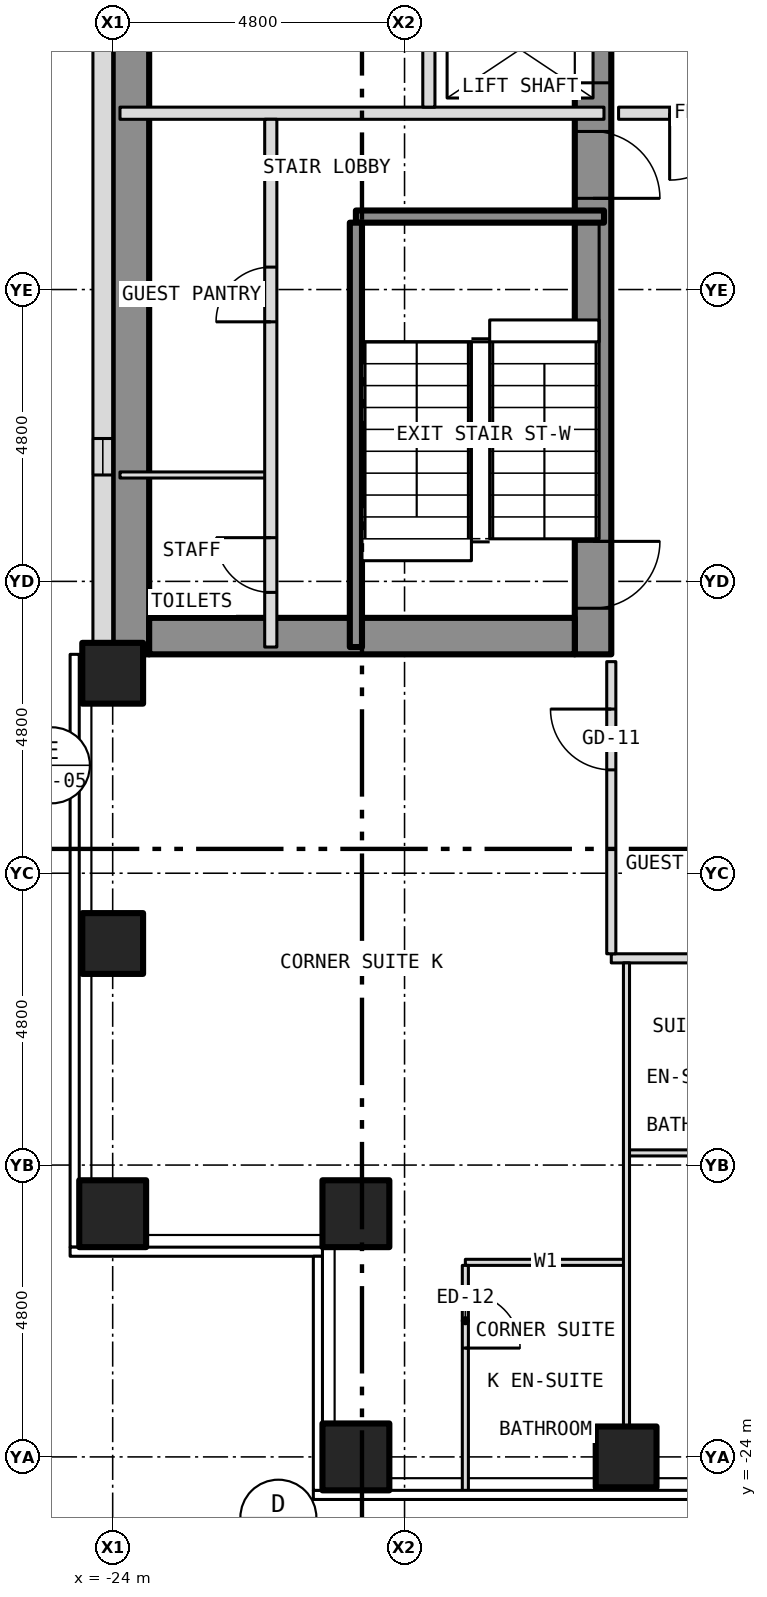
"""IFC4 building model, lengths in metres.
Left out: names, types, materials, properties, quantities, classifications, styles, units other than length and angle.
Written with IfcOpenShell. Run it as: python <this file> out.ifc"""

import sys

from ifc_helpers import new_model, si_unit, direction, frame, frame_2d, origin, origin_2d, place, context, subcontext, project, spatial, rectangle, hollow_rectangle, extrude, element, fill, save


model = new_model("IFC4")
c1 = context("Model", 3, precision=1e-05, world=origin(), true_north=direction((0.0, 1.0)))
c2 = subcontext(c1, "Body", "Model", "MODEL_VIEW")
j1 = project(units=[si_unit("LENGTHUNIT", "METRE"), si_unit("PLANEANGLEUNIT", "RADIAN")], contexts=[c1])
p1 = place(None, origin())
s1 = spatial("IfcSite", under=j1, at=p1, CompositionType="ELEMENT")
p2 = place(p1, origin())
s2 = spatial("IfcBuilding", under=s1, at=p2, CompositionType="ELEMENT")
p3 = place(p2, frame((0.0, 0.0, 39.0)))
s3 = spatial("IfcBuildingStorey", under=s2, at=p3, CompositionType="ELEMENT", Elevation=39.0)
p4 = place(p3, frame((-20.0, -24.0, -0.15), z_axis=(0.0, 0.0, 1.0), x_axis=(1.0, 0.0, 0.0)))
e1 = element("IfcColumn", 1, at=p4, inside=s3, PredefinedType="COLUMN", context=c2, shape_type="SweptSolid", body=[
    extrude(hollow_rectangle(XDim=1.1, YDim=1.1, WallThickness=0.065, at=origin_2d()), origin(), (0.0, 0.0, 1.0), 3.5),
])
p5 = place(p3, frame((-15.556, -24.0, -0.15), z_axis=(0.0, 0.0, 1.0), x_axis=(1.0, 0.0, 0.0)))
e2 = element("IfcColumn", 2, at=p5, inside=s3, PredefinedType="COLUMN", context=c2, shape_type="SweptSolid", body=[
    extrude(hollow_rectangle(XDim=1.0, YDim=1.0, WallThickness=0.06, at=origin_2d()), origin(), (0.0, 0.0, 1.0), 3.5),
])
p6 = place(p3, frame((-24.0, -20.0, -0.15), z_axis=(0.0, 0.0, 1.0), x_axis=(1.0, 0.0, 0.0)))
e3 = element("IfcColumn", 3, at=p6, inside=s3, PredefinedType="COLUMN", context=c2, shape_type="SweptSolid", body=[
    extrude(hollow_rectangle(XDim=1.1, YDim=1.1, WallThickness=0.065, at=origin_2d()), origin(), (0.0, 0.0, 1.0), 3.5),
])
for number, where, z_axis, x_axis in (
    (4, (-24.0, -15.556, -0.15), (0.0, 0.0, 1.0), (1.0, 0.0, 0.0)),
    (5, (-24.0, -11.111, -0.15), (0.0, 0.0, 1.0), (1.0, 0.0, 0.0)),
):
    element("IfcColumn", number, at=place(p3, frame(where, z_axis=z_axis, x_axis=x_axis)), inside=s3, PredefinedType="COLUMN", context=c2, shape_type="SweptSolid", body=[
        extrude(hollow_rectangle(XDim=1.0, YDim=1.0, WallThickness=0.06, at=origin_2d()), origin(), (0.0, 0.0, 1.0), 3.5),
    ])
p7 = place(p3, frame((-20.0, -20.0, -0.15), z_axis=(0.0, 0.0, 1.0), x_axis=(1.0, 0.0, 0.0)))
e6 = element("IfcColumn", 6, at=p7, inside=s3, PredefinedType="COLUMN", context=c2, shape_type="SweptSolid", body=[
    extrude(hollow_rectangle(XDim=1.1, YDim=1.1, WallThickness=0.065, at=origin_2d()), origin(), (0.0, 0.0, 1.0), 3.5),
])
p8 = place(p3, frame((-16.1, -10.8, 0.0), z_axis=(0.0, 0.0, 1.0), x_axis=(0.0, 1.0, 0.0)))
e7 = element("IfcWall", 7, at=p8, inside=s3, PredefinedType="SHEAR", context=c2, shape_type="SweptSolid", body=[
    extrude(rectangle(XDim=21.6, YDim=0.6, at=frame_2d((10.8, 0.0))), origin(), (0.0, 0.0, 1.0), 3.25),
])
p9 = place(p8, frame((9.4, 0.0, 0.0)))
e8 = element("IfcOpeningElement", 8, at=p9, cuts=e7, PredefinedType="OPENING", context=c2, shape_type="SweptSolid", body=[
    extrude(rectangle(XDim=1.1, YDim=2.1, at=frame_2d((0.55, 1.05))), frame((0.0, 0.312, 0.0), z_axis=(0.0, -1.0, 0.0), x_axis=(1.0, 0.0, 0.0)), (0.0, 0.0, 1.0), 0.624),
])
p10 = place(p8, frame((11.5, 0.0, 0.0)))
e9 = element("IfcOpeningElement", 9, at=p10, cuts=e7, PredefinedType="OPENING", context=c2, shape_type="SweptSolid", body=[
    extrude(rectangle(XDim=1.1, YDim=2.1, at=frame_2d((0.55, 1.05))), frame((0.0, 0.312, 0.0), z_axis=(0.0, -1.0, 0.0), x_axis=(1.0, 0.0, 0.0)), (0.0, 0.0, 1.0), 0.624),
])
p11 = place(p8, frame((13.6, 0.0, 0.0)))
e10 = element("IfcOpeningElement", 10, at=p11, cuts=e7, PredefinedType="OPENING", context=c2, shape_type="SweptSolid", body=[
    extrude(rectangle(XDim=1.1, YDim=2.1, at=frame_2d((0.55, 1.05))), frame((0.0, 0.312, 0.0), z_axis=(0.0, -1.0, 0.0), x_axis=(1.0, 0.0, 0.0)), (0.0, 0.0, 1.0), 0.624),
])
p12 = place(p8, frame((15.7, 0.0, 0.0)))
e11 = element("IfcOpeningElement", 11, at=p12, cuts=e7, PredefinedType="OPENING", context=c2, shape_type="SweptSolid", body=[
    extrude(rectangle(XDim=1.1, YDim=2.1, at=frame_2d((0.55, 1.05))), frame((0.0, 0.312, 0.0), z_axis=(0.0, -1.0, 0.0), x_axis=(1.0, 0.0, 0.0)), (0.0, 0.0, 1.0), 0.624),
])
p13 = place(p8, frame((17.8, 0.0, 0.0)))
e12 = element("IfcOpeningElement", 12, at=p13, cuts=e7, PredefinedType="OPENING", context=c2, shape_type="SweptSolid", body=[
    extrude(rectangle(XDim=1.1, YDim=2.1, at=frame_2d((0.55, 1.05))), frame((0.0, 0.312, 0.0), z_axis=(0.0, -1.0, 0.0), x_axis=(1.0, 0.0, 0.0)), (0.0, 0.0, 1.0), 0.624),
])
p14 = place(p8, frame((0.758, 0.0, 0.0)))
e13 = element("IfcOpeningElement", 13, at=p14, cuts=e7, PredefinedType="OPENING", context=c2, shape_type="SweptSolid", body=[
    extrude(rectangle(XDim=1.1, YDim=2.1, at=frame_2d((0.55, 1.05))), frame((0.0, 0.312, 0.0), z_axis=(0.0, -1.0, 0.0), x_axis=(1.0, 0.0, 0.0)), (0.0, 0.0, 1.0), 0.624),
])
p15 = place(p8, frame((7.5, 0.0, 0.0)))
e14 = element("IfcOpeningElement", 14, at=p15, cuts=e7, PredefinedType="OPENING", context=c2, shape_type="SweptSolid", body=[
    extrude(rectangle(XDim=1.1, YDim=2.1, at=frame_2d((0.55, 1.05))), frame((0.0, 0.312, 0.0), z_axis=(0.0, -1.0, 0.0), x_axis=(1.0, 0.0, 0.0)), (0.0, 0.0, 1.0), 0.624),
])
p16 = place(p3, frame((-23.7, -10.8, 0.0), z_axis=(0.0, 0.0, 1.0), x_axis=(0.0, 1.0, 0.0)))
e15 = element("IfcWall", 15, at=p16, inside=s3, PredefinedType="SHEAR", context=c2, shape_type="SweptSolid", body=[
    extrude(rectangle(XDim=21.6, YDim=0.6, at=frame_2d((10.8, 0.0))), origin(), (0.0, 0.0, 1.0), 3.25),
])
p17 = place(p3, frame((-23.4, -10.5, 0.0), z_axis=(0.0, 0.0, 1.0), x_axis=(1.0, 0.0, 0.0)))
e16 = element("IfcWall", 16, at=p17, inside=s3, PredefinedType="SHEAR", context=c2, shape_type="SweptSolid", body=[
    extrude(rectangle(XDim=7.0, YDim=0.6, at=frame_2d((3.5, 0.0))), origin(), (0.0, 0.0, 1.0), 3.25),
])
p18 = place(p3, frame((-24.163, 10.8, 0.0), z_axis=(0.0, 0.0, 1.0), x_axis=(0.0, -1.0, 0.0)))
e17 = element("IfcWall", 17, at=p18, inside=s3, PredefinedType="SOLIDWALL", context=c2, shape_type="SweptSolid", body=[
    extrude(rectangle(XDim=21.6, YDim=0.325, at=frame_2d((10.8, 0.0))), origin(), (0.0, 0.0, 1.0), 3.5),
])
p19 = place(p18, frame((18.05, 0.0, 1.0)))
e18 = element("IfcOpeningElement", 18, at=p19, cuts=e17, PredefinedType="OPENING", context=c2, shape_type="SweptSolid", body=[
    extrude(rectangle(XDim=0.6, YDim=1.5, at=frame_2d((0.3, 0.75))), frame((0.0, 0.175, 0.0), z_axis=(0.0, -1.0, 0.0), x_axis=(1.0, 0.0, 0.0)), (0.0, 0.0, 1.0), 0.349),
])
p20 = place(p3, frame((-18.2, -20.8, 0.0), z_axis=(0.0, 0.0, 1.0), x_axis=(1.0, 0.0, 0.0)))
e19 = element("IfcWall", 19, at=p20, inside=s3, PredefinedType="PARTITIONING", context=c2, shape_type="SweptSolid", body=[
    extrude(rectangle(XDim=2.65, YDim=0.1, at=frame_2d((1.325, 0.0))), origin(), (0.0, 0.0, 1.0), 3.35),
])
p21 = place(p3, frame((-15.55, -19.0, 0.0), z_axis=(0.0, 0.0, 1.0), x_axis=(1.0, 0.0, 0.0)))
e20 = element("IfcWall", 20, at=p21, inside=s3, PredefinedType="PARTITIONING", context=c2, shape_type="SweptSolid", body=[
    extrude(rectangle(XDim=2.2, YDim=0.1, at=frame_2d((1.1, 0.0))), origin(), (0.0, 0.0, 1.0), 3.35),
])
p22 = place(p3, frame((-15.8, -15.8, 0.0), z_axis=(0.0, 0.0, 1.0), x_axis=(1.0, 0.0, 0.0)))
e21 = element("IfcWall", 21, at=p22, inside=s3, PredefinedType="PARTITIONING", context=c2, shape_type="SweptSolid", body=[
    extrude(rectangle(XDim=31.6, YDim=0.15, at=frame_2d((15.8, 0.0))), origin(), (0.0, 0.0, 1.0), 3.35),
])
p23 = place(p22, frame((6.633, 0.0, 0.0)))
e22 = element("IfcOpeningElement", 22, at=p23, cuts=e21, PredefinedType="OPENING", context=c2, shape_type="SweptSolid", body=[
    extrude(rectangle(XDim=1.0, YDim=2.1, at=frame_2d((0.5, 1.05))), frame((0.0, 0.087, 0.0), z_axis=(0.0, -1.0, 0.0), x_axis=(1.0, 0.0, 0.0)), (0.0, 0.0, 1.0), 0.174),
])
p24 = place(p22, frame((11.956, 0.0, 0.0)))
e23 = element("IfcOpeningElement", 23, at=p24, cuts=e21, PredefinedType="OPENING", context=c2, shape_type="SweptSolid", body=[
    extrude(rectangle(XDim=1.0, YDim=2.1, at=frame_2d((0.5, 1.05))), frame((0.0, 0.087, 0.0), z_axis=(0.0, -1.0, 0.0), x_axis=(1.0, 0.0, 0.0)), (0.0, 0.0, 1.0), 0.174),
])
p25 = place(p22, frame((16.4, 0.0, 0.0)))
e24 = element("IfcOpeningElement", 24, at=p25, cuts=e21, PredefinedType="OPENING", context=c2, shape_type="SweptSolid", body=[
    extrude(rectangle(XDim=1.0, YDim=2.1, at=frame_2d((0.5, 1.05))), frame((0.0, 0.087, 0.0), z_axis=(0.0, -1.0, 0.0), x_axis=(1.0, 0.0, 0.0)), (0.0, 0.0, 1.0), 0.174),
])
p26 = place(p22, frame((21.956, 0.0, 0.0)))
e25 = element("IfcOpeningElement", 25, at=p26, cuts=e21, PredefinedType="OPENING", context=c2, shape_type="SweptSolid", body=[
    extrude(rectangle(XDim=1.0, YDim=2.1, at=frame_2d((0.5, 1.05))), frame((0.0, 0.087, 0.0), z_axis=(0.0, -1.0, 0.0), x_axis=(1.0, 0.0, 0.0)), (0.0, 0.0, 1.0), 0.174),
])
p27 = place(p22, frame((28.623, 0.0, 0.0)))
e26 = element("IfcOpeningElement", 26, at=p27, cuts=e21, PredefinedType="OPENING", context=c2, shape_type="SweptSolid", body=[
    extrude(rectangle(XDim=1.0, YDim=2.1, at=frame_2d((0.5, 1.05))), frame((0.0, 0.087, 0.0), z_axis=(0.0, -1.0, 0.0), x_axis=(1.0, 0.0, 0.0)), (0.0, 0.0, 1.0), 0.174),
])
p28 = place(p3, frame((-23.88, -7.85, 0.0), z_axis=(0.0, 0.0, 1.0), x_axis=(1.0, 0.0, 0.0)))
e27 = element("IfcWall", 27, at=p28, inside=s3, PredefinedType="PARTITIONING", context=c2, shape_type="SweptSolid", body=[
    extrude(rectangle(XDim=2.48, YDim=0.1, at=frame_2d((1.24, 0.0))), origin(), (0.0, 0.0, 1.0), 3.25),
])
p29 = place(p3, frame((-20.0, -3.6, 0.0), z_axis=(0.0, 0.0, 1.0), x_axis=(1.0, 0.0, 0.0)))
e28 = element("IfcWall", 28, at=p29, inside=s3, PredefinedType="SHEAR", context=c2, shape_type="SweptSolid", body=[
    extrude(rectangle(XDim=4.08, YDim=0.2, at=frame_2d((2.04, 0.0))), origin(), (0.0, 0.0, 1.0), 3.25),
])
p30 = place(p3, frame((-23.88, -1.9, 0.0), z_axis=(0.0, 0.0, 1.0), x_axis=(1.0, 0.0, 0.0)))
e29 = element("IfcWall", 29, at=p30, inside=s3, PredefinedType="PARTITIONING", context=c2, shape_type="SweptSolid", body=[
    extrude(rectangle(XDim=7.96, YDim=0.2, at=frame_2d((3.98, 0.0))), origin(), (0.0, 0.0, 1.0), 3.25),
])
p31 = place(p3, frame((-15.68, -1.9, 0.0), z_axis=(0.0, 0.0, 1.0), x_axis=(1.0, 0.0, 0.0)))
e30 = element("IfcWall", 30, at=p31, inside=s3, PredefinedType="PARTITIONING", context=c2, shape_type="SweptSolid", body=[
    extrude(rectangle(XDim=3.28, YDim=0.2, at=frame_2d((1.64, 0.0))), origin(), (0.0, 0.0, 1.0), 3.35),
])
p32 = place(p31, frame((0.84, 0.0, 0.0)))
e31 = element("IfcOpeningElement", 31, at=p32, cuts=e30, PredefinedType="OPENING", context=c2, shape_type="SweptSolid", body=[
    extrude(rectangle(XDim=1.1, YDim=2.1, at=frame_2d((0.55, 1.05))), frame((0.0, 0.112, 0.0), z_axis=(0.0, -1.0, 0.0), x_axis=(1.0, 0.0, 0.0)), (0.0, 0.0, 1.0), 0.224),
])
p33 = place(p3, frame((-21.4, -10.68, 0.0), z_axis=(0.0, 0.0, 1.0), x_axis=(0.0, 1.0, 0.0)))
e32 = element("IfcWall", 32, at=p33, inside=s3, PredefinedType="PARTITIONING", context=c2, shape_type="SweptSolid", body=[
    extrude(rectangle(XDim=8.68, YDim=0.2, at=frame_2d((4.34, 0.0))), origin(), (0.0, 0.0, 1.0), 3.25),
])
p34 = place(p33, frame((0.899, 0.0, 0.0)))
e33 = element("IfcOpeningElement", 33, at=p34, cuts=e32, PredefinedType="OPENING", context=c2, shape_type="SweptSolid", body=[
    extrude(rectangle(XDim=0.9, YDim=2.1, at=frame_2d((0.45, 1.05))), frame((0.0, 0.112, 0.0), z_axis=(0.0, -1.0, 0.0), x_axis=(1.0, 0.0, 0.0)), (0.0, 0.0, 1.0), 0.224),
])
p35 = place(p33, frame((5.349, 0.0, 0.0)))
e34 = element("IfcOpeningElement", 34, at=p35, cuts=e32, PredefinedType="OPENING", context=c2, shape_type="SweptSolid", body=[
    extrude(rectangle(XDim=0.9, YDim=2.1, at=frame_2d((0.45, 1.05))), frame((0.0, 0.112, 0.0), z_axis=(0.0, -1.0, 0.0), x_axis=(1.0, 0.0, 0.0)), (0.0, 0.0, 1.0), 0.224),
])
p36 = place(p3, frame((-20.0, -10.68, 0.0), z_axis=(0.0, 0.0, 1.0), x_axis=(0.0, 1.0, 0.0)))
e35 = element("IfcWall", 35, at=p36, inside=s3, PredefinedType="SHEAR", context=c2, shape_type="SweptSolid", body=[
    extrude(rectangle(XDim=6.98, YDim=0.2, at=frame_2d((3.49, 0.0))), origin(), (0.0, 0.0, 1.0), 3.25),
])
p37 = place(p3, frame((-18.8, -1.8, 0.0), z_axis=(0.0, 0.0, 1.0), x_axis=(0.0, 1.0, 0.0)))
e36 = element("IfcWall", 36, at=p37, inside=s3, PredefinedType="PARTITIONING", context=c2, shape_type="SweptSolid", body=[
    extrude(rectangle(XDim=12.48, YDim=0.2, at=frame_2d((6.24, 0.0))), origin(), (0.0, 0.0, 1.0), 3.25),
])
p38 = place(p3, frame((-18.2, -24.58, 0.0), z_axis=(0.0, 0.0, 1.0), x_axis=(0.0, 1.0, 0.0)))
e37 = element("IfcWall", 37, at=p38, inside=s3, PredefinedType="PARTITIONING", context=c2, shape_type="SweptSolid", body=[
    extrude(rectangle(XDim=3.73, YDim=0.1, at=frame_2d((1.865, 0.0))), origin(), (0.0, 0.0, 1.0), 3.35),
])
p39 = place(p38, frame((2.37, 0.0, 0.0)))
e38 = element("IfcOpeningElement", 38, at=p39, cuts=e37, PredefinedType="OPENING", context=c2, shape_type="SweptSolid", body=[
    extrude(rectangle(XDim=0.9, YDim=2.1, at=frame_2d((0.45, 1.05))), frame((0.0, 0.062, 0.0), z_axis=(0.0, -1.0, 0.0), x_axis=(1.0, 0.0, 0.0)), (0.0, 0.0, 1.0), 0.124),
])
p40 = place(p3, frame((-15.8, -15.725, 0.0), z_axis=(0.0, 0.0, 1.0), x_axis=(0.0, 1.0, 0.0)))
e39 = element("IfcWall", 39, at=p40, inside=s3, PredefinedType="PARTITIONING", context=c2, shape_type="SweptSolid", body=[
    extrude(rectangle(XDim=4.805, YDim=0.15, at=frame_2d((2.403, 0.0))), origin(), (0.0, 0.0, 1.0), 3.35),
])
p41 = place(p40, frame((3.025, 0.0, 0.0)))
e40 = element("IfcOpeningElement", 40, at=p41, cuts=e39, PredefinedType="OPENING", context=c2, shape_type="SweptSolid", body=[
    extrude(rectangle(XDim=1.0, YDim=2.1, at=frame_2d((0.5, 1.05))), frame((0.0, 0.087, 0.0), z_axis=(0.0, -1.0, 0.0), x_axis=(1.0, 0.0, 0.0)), (0.0, 0.0, 1.0), 0.174),
])
p42 = place(p3, frame((-15.55, -23.88, 0.0), z_axis=(0.0, 0.0, 1.0), x_axis=(0.0, 1.0, 0.0)))
e41 = element("IfcWall", 41, at=p42, inside=s3, PredefinedType="PARTITIONING", context=c2, shape_type="SweptSolid", body=[
    extrude(rectangle(XDim=8.005, YDim=0.1, at=frame_2d((4.002, 0.0))), origin(), (0.0, 0.0, 1.0), 3.35),
])
p43 = place(p19, origin())
e42 = element("IfcWindow", 42, at=p43, inside=s3, PartitioningType="SINGLE_PANEL", PredefinedType="WINDOW", context=c2, shape_type="SweptSolid", body=[
    extrude(rectangle(XDim=0.6, YDim=1.5, at=frame_2d((0.3, 0.75))), frame((0.0, -0.073, 0.0), z_axis=(0.0, -1.0, 0.0), x_axis=(1.0, 0.0, 0.0)), (0.0, 0.0, 1.0), 0.06),
])
fill(e18, e42)
p44 = place(p9, origin())
e43 = element("IfcDoor", 43, at=p44, inside=s3, OperationType="SLIDING_TO_LEFT", PredefinedType="DOOR", context=c2, shape_type="SweptSolid", body=[
    extrude(rectangle(XDim=1.1, YDim=2.1, at=frame_2d((0.55, 1.05))), frame((0.0, 0.025, 0.0), z_axis=(0.0, -1.0, 0.0), x_axis=(1.0, 0.0, 0.0)), (0.0, 0.0, 1.0), 0.05),
])
fill(e8, e43)
p45 = place(p14, origin())
e44 = element("IfcDoor", 44, at=p45, inside=s3, OperationType="SINGLE_SWING_RIGHT", PredefinedType="DOOR", context=c2, shape_type="SweptSolid", body=[
    extrude(rectangle(XDim=1.1, YDim=2.1, at=frame_2d((0.55, 1.05))), frame((0.0, 0.025, 0.0), z_axis=(0.0, -1.0, 0.0), x_axis=(1.0, 0.0, 0.0)), (0.0, 0.0, 1.0), 0.05),
])
fill(e13, e44)
p46 = place(p15, origin())
e45 = element("IfcDoor", 45, at=p46, inside=s3, OperationType="SINGLE_SWING_LEFT", PredefinedType="DOOR", context=c2, shape_type="SweptSolid", body=[
    extrude(rectangle(XDim=1.1, YDim=2.1, at=frame_2d((0.55, 1.05))), frame((0.0, 0.025, 0.0), z_axis=(0.0, -1.0, 0.0), x_axis=(1.0, 0.0, 0.0)), (0.0, 0.0, 1.0), 0.05),
])
fill(e14, e45)
p47 = place(p34, origin())
e46 = element("IfcDoor", 46, at=p47, inside=s3, OperationType="SINGLE_SWING_RIGHT", PredefinedType="DOOR", context=c2, shape_type="SweptSolid", body=[
    extrude(rectangle(XDim=0.9, YDim=2.1, at=frame_2d((0.45, 1.05))), frame((0.0, 0.025, 0.0), z_axis=(0.0, -1.0, 0.0), x_axis=(1.0, 0.0, 0.0)), (0.0, 0.0, 1.0), 0.05),
])
fill(e33, e46)
p48 = place(p35, origin())
e47 = element("IfcDoor", 47, at=p48, inside=s3, OperationType="SINGLE_SWING_LEFT", PredefinedType="DOOR", context=c2, shape_type="SweptSolid", body=[
    extrude(rectangle(XDim=0.9, YDim=2.1, at=frame_2d((0.45, 1.05))), frame((0.0, 0.025, 0.0), z_axis=(0.0, -1.0, 0.0), x_axis=(1.0, 0.0, 0.0)), (0.0, 0.0, 1.0), 0.05),
])
fill(e34, e47)
p49 = place(p32, origin())
e48 = element("IfcDoor", 48, at=p49, inside=s3, OperationType="SINGLE_SWING_LEFT", PredefinedType="DOOR", context=c2, shape_type="SweptSolid", body=[
    extrude(rectangle(XDim=1.1, YDim=2.1, at=frame_2d((0.55, 1.05))), frame((0.0, 0.025, 0.0), z_axis=(0.0, -1.0, 0.0), x_axis=(1.0, 0.0, 0.0)), (0.0, 0.0, 1.0), 0.05),
])
fill(e31, e48)
p50 = place(p39, origin())
e49 = element("IfcDoor", 49, at=p50, inside=s3, OperationType="SINGLE_SWING_LEFT", PredefinedType="DOOR", context=c2, shape_type="SweptSolid", body=[
    extrude(rectangle(XDim=0.9, YDim=2.1, at=frame_2d((0.45, 1.05))), frame((0.0, 0.025, 0.0), z_axis=(0.0, -1.0, 0.0), x_axis=(1.0, 0.0, 0.0)), (0.0, 0.0, 1.0), 0.05),
])
fill(e38, e49)
p51 = place(p41, origin())
e50 = element("IfcDoor", 50, at=p51, inside=s3, OperationType="SINGLE_SWING_RIGHT", PredefinedType="DOOR", context=c2, shape_type="SweptSolid", body=[
    extrude(rectangle(XDim=1.0, YDim=2.1, at=frame_2d((0.5, 1.05))), frame((0.0, 0.025, 0.0), z_axis=(0.0, -1.0, 0.0), x_axis=(1.0, 0.0, 0.0)), (0.0, 0.0, 1.0), 0.05),
])
fill(e40, e50)
save(model, sys.argv[1])
